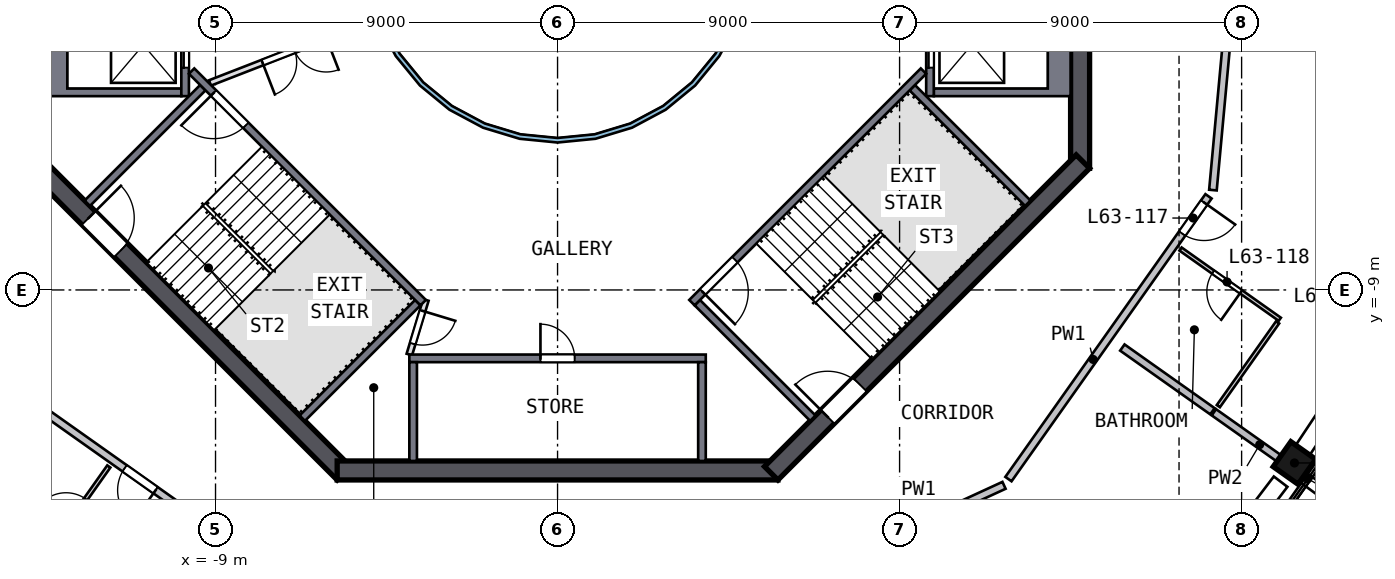
"""IFC4 building model, lengths in metres.
Left out: names, types, materials, properties, quantities, classifications, styles, units other than length and angle.
Written with IfcOpenShell. Run it as: python <this file> out.ifc"""

import sys

from ifc_helpers import new_model, si_unit, direction, frame, frame_2d, origin, origin_2d, place, context, subcontext, project, spatial, polyline, rectangle, outline, extrude, element, fill, save


model = new_model("IFC4")
c1 = context("Model", 3, precision=1e-05, world=origin(), true_north=direction((0.0, 1.0)))
c2 = subcontext(c1, "Body", "Model", "MODEL_VIEW")
j1 = project(units=[si_unit("LENGTHUNIT", "METRE"), si_unit("PLANEANGLEUNIT", "RADIAN")], contexts=[c1])
p1 = place(None, origin())
s1 = spatial("IfcSite", under=j1, at=p1, CompositionType="ELEMENT")
p2 = place(p1, origin())
s2 = spatial("IfcBuilding", under=s1, at=p2, CompositionType="ELEMENT")
p3 = place(p2, frame((0.0, 0.0, 256.0)))
s3 = spatial("IfcBuildingStorey", under=s2, at=p3, CompositionType="ELEMENT", Elevation=256.0)
p4 = place(p3, frame((19.313, -13.664, 0.0), z_axis=(0.06418503, 0.092399066, 0.993651194), x_axis=(0.573792389, 0.811237258, -0.112500692)))
e1 = element("IfcColumn", 1, at=p4, inside=s3, PredefinedType="COLUMN", context=c2, shape_type="SweptSolid", body=[
    extrude(rectangle(XDim=0.8, YDim=0.8, at=origin_2d()), origin(), (0.0, 0.0, 1.0), 3.21),
])
p5 = place(p3, frame((13.75, -5.799, 0.0), z_axis=(0.0, 0.0, 1.0), x_axis=(0.0, 1.0, 0.0)))
e2 = element("IfcWall", 2, at=p5, inside=s3, PredefinedType="SHEAR", context=c2, shape_type="SweptSolid", body=[
    extrude(rectangle(XDim=11.598, YDim=0.5, at=frame_2d((5.799, 0.0))), origin(), (0.0, 0.0, 1.0), 3.5),
])
p6 = place(p5, frame((4.899, 0.0, 0.0)))
e3 = element("IfcOpeningElement", 3, at=p6, cuts=e2, PredefinedType="OPENING", context=c2, shape_type="SweptSolid", body=[
    extrude(rectangle(XDim=1.8, YDim=2.1, at=frame_2d((0.9, 1.05))), frame((0.0, 0.26, 0.0), z_axis=(0.0, -1.0, 0.0), x_axis=(1.0, 0.0, 0.0)), (0.0, 0.0, 1.0), 0.52),
])
p7 = place(p3, frame((-13.823, -5.622, 0.0), z_axis=(0.0, 0.0, 1.0), x_axis=(0.707106781, -0.707106781, 0.0)))
e4 = element("IfcWall", 4, at=p7, inside=s3, PredefinedType="SHEAR", context=c2, shape_type="SweptSolid", body=[
    extrude(rectangle(XDim=11.598, YDim=0.5, at=frame_2d((5.799, 0.0))), origin(), (0.0, 0.0, 1.0), 3.5),
])
p8 = place(p7, frame((2.099, 0.0, 0.0)))
e5 = element("IfcOpeningElement", 5, at=p8, cuts=e4, PredefinedType="OPENING", context=c2, shape_type="SweptSolid", body=[
    extrude(rectangle(XDim=1.2, YDim=2.1, at=frame_2d((0.6, 1.05))), frame((0.0, 0.26, 0.0), z_axis=(0.0, -1.0, 0.0), x_axis=(1.0, 0.0, 0.0)), (0.0, 0.0, 1.0), 0.52),
])
p9 = place(p3, frame((-5.799, -13.75, 0.0), z_axis=(0.0, 0.0, 1.0), x_axis=(1.0, 0.0, 0.0)))
e6 = element("IfcWall", 6, at=p9, inside=s3, PredefinedType="SHEAR", context=c2, shape_type="SweptSolid", body=[
    extrude(rectangle(XDim=11.598, YDim=0.5, at=frame_2d((5.799, 0.0))), origin(), (0.0, 0.0, 1.0), 3.5),
])
p10 = place(p3, frame((5.622, -13.823, 0.0), z_axis=(0.0, 0.0, 1.0), x_axis=(0.707106781, 0.707106781, 0.0)))
e7 = element("IfcWall", 7, at=p10, inside=s3, PredefinedType="SHEAR", context=c2, shape_type="SweptSolid", body=[
    extrude(rectangle(XDim=11.598, YDim=0.5, at=frame_2d((5.799, 0.0))), origin(), (0.0, 0.0, 1.0), 3.5),
])
p11 = place(p10, frame((2.099, 0.0, 0.0)))
e8 = element("IfcOpeningElement", 8, at=p11, cuts=e7, PredefinedType="OPENING", context=c2, shape_type="SweptSolid", body=[
    extrude(rectangle(XDim=1.2, YDim=2.1, at=frame_2d((0.6, 1.05))), frame((0.0, 0.26, 0.0), z_axis=(0.0, -1.0, 0.0), x_axis=(1.0, 0.0, 0.0)), (0.0, 0.0, 1.0), 0.52),
])
p12 = place(p3, frame((18.039, -21.612, 0.0), z_axis=(0.0, 0.0, 1.0), x_axis=(0.577575484, 0.816337283, 0.0)))
e9 = element("IfcWall", 9, at=p12, inside=s3, PredefinedType="SOLIDWALL", context=c2, shape_type="SweptSolid", body=[
    extrude(rectangle(XDim=13.723, YDim=0.5, at=frame_2d((6.862, 0.0))), origin(), (0.0, 0.0, 1.0), 0.7),
])
p13 = place(p3, origin())
e10 = element("IfcWall", 10, at=p13, inside=s3, PredefinedType="SOLIDWALL", context=c2, shape_type="SweptSolid", body=[
    extrude(outline(polyline([(13.5, -3.9), (9.9, -3.9), (9.9, -3.7), (12.9, -3.7), (12.9, -1.4), (9.9, -1.4), (9.9, -1.2), (13.5, -1.2), (13.5, -3.9)])), origin(), (0.0, 0.0, 1.0), 3.19),
])
p14 = place(p3, frame((9.8, -1.2, 0.0), z_axis=(0.0, 0.0, 1.0), x_axis=(0.0, -1.0, 0.0)))
e11 = element("IfcWall", 11, at=p14, inside=s3, PredefinedType="SOLIDWALL", context=c2, shape_type="SweptSolid", body=[
    extrude(rectangle(XDim=2.7, YDim=0.2, at=frame_2d((1.35, 0.0))), origin(), (0.0, 0.0, 1.0), 3.19),
])
p15 = place(p14, frame((0.75, 0.0, 0.0)))
e12 = element("IfcOpeningElement", 12, at=p15, cuts=e11, PredefinedType="OPENING", context=c2, shape_type="SweptSolid", body=[
    extrude(rectangle(XDim=1.2, YDim=2.1, at=frame_2d((0.6, 1.05))), frame((0.0, 0.11, 0.0), z_axis=(0.0, -1.0, 0.0), x_axis=(1.0, 0.0, 0.0)), (0.0, 0.0, 1.0), 0.22),
])
p16 = place(p3, origin())
e13 = element("IfcWall", 13, at=p16, inside=s3, PredefinedType="SOLIDWALL", context=c2, shape_type="SweptSolid", body=[
    extrude(outline(polyline([(-13.5, -3.9), (-13.5, -1.2), (-9.9, -1.2), (-9.9, -1.4), (-12.9, -1.4), (-12.9, -3.7), (-9.9, -3.7), (-9.9, -3.9), (-13.5, -3.9)])), origin(), (0.0, 0.0, 1.0), 3.19),
])
p17 = place(p3, frame((-9.8, -1.2, 0.0), z_axis=(0.0, 0.0, 1.0), x_axis=(0.0, -1.0, 0.0)))
e14 = element("IfcWall", 14, at=p17, inside=s3, PredefinedType="SOLIDWALL", context=c2, shape_type="SweptSolid", body=[
    extrude(rectangle(XDim=2.7, YDim=0.2, at=frame_2d((1.35, 0.0))), origin(), (0.0, 0.0, 1.0), 3.19),
])
p18 = place(p17, frame((0.75, 0.0, 0.0)))
e15 = element("IfcOpeningElement", 15, at=p18, cuts=e14, PredefinedType="OPENING", context=c2, shape_type="SweptSolid", body=[
    extrude(rectangle(XDim=1.2, YDim=2.1, at=frame_2d((0.6, 1.05))), frame((0.0, 0.11, 0.0), z_axis=(0.0, -1.0, 0.0), x_axis=(1.0, 0.0, 0.0)), (0.0, 0.0, 1.0), 0.22),
])
p19 = place(p3, frame((-3.9, -10.8, 0.0), z_axis=(0.0, 0.0, 1.0), x_axis=(1.0, 0.0, 0.0)))
e16 = element("IfcWall", 16, at=p19, inside=s3, PredefinedType="SOLIDWALL", context=c2, shape_type="SweptSolid", body=[
    extrude(rectangle(XDim=7.8, YDim=0.2, at=frame_2d((3.9, 0.0))), origin(), (0.0, 0.0, 1.0), 3.19),
])
p20 = place(p19, frame((3.45, 0.0, 0.0)))
e17 = element("IfcOpeningElement", 17, at=p20, cuts=e16, PredefinedType="OPENING", context=c2, shape_type="SweptSolid", body=[
    extrude(rectangle(XDim=0.9, YDim=2.1, at=frame_2d((0.45, 1.05))), frame((0.0, 0.11, 0.0), z_axis=(0.0, -1.0, 0.0), x_axis=(1.0, 0.0, 0.0)), (0.0, 0.0, 1.0), 0.22),
])
for number, where, z_axis, x_axis in (
    (18, (-3.8, -10.9, 0.0), (0.0, 0.0, 1.0), (0.0, -1.0, 0.0)),
    (19, (3.8, -10.9, 0.0), (0.0, 0.0, 1.0), (0.0, -1.0, 0.0)),
):
    element("IfcWall", number, at=place(p3, frame(where, z_axis=z_axis, x_axis=x_axis)), inside=s3, PredefinedType="SOLIDWALL", context=c2, shape_type="SweptSolid", body=[
        extrude(rectangle(XDim=2.6, YDim=0.2, at=frame_2d((1.3, 0.0))), origin(), (0.0, 0.0, 1.0), 3.19),
    ])
p21 = place(p3, frame((-3.535, -9.334, 0.0), z_axis=(0.0, 0.0, 1.0), x_axis=(-0.707120946, 0.707092617, 0.0)))
e20 = element("IfcWall", 20, at=p21, inside=s3, PredefinedType="SOLIDWALL", context=c2, shape_type="SweptSolid", body=[
    extrude(rectangle(XDim=8.618, YDim=0.2, at=frame_2d((4.309, 0.0))), origin(), (0.0, 0.0, 1.0), 3.19),
])
p22 = place(p21, frame((6.6, 0.0, 0.0)))
e21 = element("IfcOpeningElement", 21, at=p22, cuts=e20, PredefinedType="OPENING", context=c2, shape_type="SweptSolid", body=[
    extrude(rectangle(XDim=1.2, YDim=2.1, at=frame_2d((0.6, 1.05))), frame((0.0, 0.11, 0.0), z_axis=(0.0, -1.0, 0.0), x_axis=(1.0, 0.0, 0.0)), (0.0, 0.0, 1.0), 0.22),
])
for number, where, z_axis, x_axis in (
    (22, (-9.334, -3.677, 0.0), (0.0, 0.0, 1.0), (-0.707, -0.707, 0.0)),
    (23, (-3.677, -9.334, 0.0), (0.0, 0.0, 1.0), (-0.707, -0.707, 0.0)),
):
    element("IfcWall", number, at=place(p3, frame(where, z_axis=z_axis, x_axis=x_axis)), inside=s3, PredefinedType="SOLIDWALL", context=c2, shape_type="SweptSolid", body=[
        extrude(rectangle(XDim=4.3, YDim=0.2, at=frame_2d((2.15, 0.0))), origin(), (0.0, 0.0, 1.0), 3.19),
    ])
p23 = place(p3, frame((9.629, -3.24, 0.0), z_axis=(0.0, 0.0, 1.0), x_axis=(-0.707120946, -0.707092617, 0.0)))
e24 = element("IfcWall", 24, at=p23, inside=s3, PredefinedType="SOLIDWALL", context=c2, shape_type="SweptSolid", body=[
    extrude(rectangle(XDim=8.618, YDim=0.2, at=frame_2d((4.309, 0.0))), origin(), (0.0, 0.0, 1.0), 3.19),
])
p24 = place(p23, frame((7.018, 0.0, 0.0)))
e25 = element("IfcOpeningElement", 25, at=p24, cuts=e24, PredefinedType="OPENING", context=c2, shape_type="SweptSolid", body=[
    extrude(rectangle(XDim=1.2, YDim=2.1, at=frame_2d((0.6, 1.05))), frame((0.0, 0.11, 0.0), z_axis=(0.0, -1.0, 0.0), x_axis=(1.0, 0.0, 0.0)), (0.0, 0.0, 1.0), 0.22),
])
for number, where, z_axis, x_axis in (
    (26, (3.677, -9.334, 0.0), (0.0, 0.0, 1.0), (0.707, -0.707, 0.0)),
    (27, (9.334, -3.677, 0.0), (0.0, 0.0, 1.0), (0.707, -0.707, 0.0)),
):
    element("IfcWall", number, at=place(p3, frame(where, z_axis=z_axis, x_axis=x_axis)), inside=s3, PredefinedType="SOLIDWALL", context=c2, shape_type="SweptSolid", body=[
        extrude(rectangle(XDim=4.3, YDim=0.2, at=frame_2d((2.15, 0.0))), origin(), (0.0, 0.0, 1.0), 3.19),
    ])
p25 = place(p3, frame((-3.465, -9.263, 0.0), z_axis=(0.0, 0.0, 1.0), x_axis=(-0.289808785, -0.957084567, 0.0)))
e28 = element("IfcWall", 28, at=p25, inside=s3, PredefinedType="PARTITIONING", context=c2, shape_type="SweptSolid", body=[
    extrude(rectangle(XDim=1.501, YDim=0.15, at=frame_2d((0.75, 0.0))), origin(), (0.0, 0.0, 1.0), 3.19),
])
p26 = place(p25, frame((0.301, 0.0, 0.0)))
e29 = element("IfcOpeningElement", 29, at=p26, cuts=e28, PredefinedType="OPENING", context=c2, shape_type="SweptSolid", body=[
    extrude(rectangle(XDim=0.9, YDim=2.1, at=frame_2d((0.45, 1.05))), frame((0.0, 0.085, 0.0), z_axis=(0.0, -1.0, 0.0), x_axis=(1.0, 0.0, 0.0)), (0.0, 0.0, 1.0), 0.17),
])
p27 = place(p3, frame((-4.782, -1.857, 0.0), z_axis=(0.0, 0.0, 1.0), x_axis=(-0.932155279, -0.362058746, 0.0)))
e30 = element("IfcWall", 30, at=p27, inside=s3, PredefinedType="PARTITIONING", context=c2, shape_type="SweptSolid", body=[
    extrude(rectangle(XDim=4.682, YDim=0.15, at=frame_2d((2.341, 0.0))), origin(), (0.0, 0.0, 1.0), 3.19),
])
p28 = place(p27, frame((1.4, 0.0, 0.0)))
e31 = element("IfcOpeningElement", 31, at=p28, cuts=e30, PredefinedType="OPENING", context=c2, shape_type="SweptSolid", body=[
    extrude(rectangle(XDim=1.8, YDim=2.1, at=frame_2d((0.9, 1.05))), frame((0.0, 0.085, 0.0), z_axis=(0.0, -1.0, 0.0), x_axis=(1.0, 0.0, 0.0)), (0.0, 0.0, 1.0), 0.17),
])
p29 = place(p3, origin())
e32 = element("IfcWall", 32, at=p29, inside=s3, PredefinedType="SOLIDWALL", context=c2, shape_type="SweptSolid", body=[
    extrude(outline(polyline([(5.021, -0.999), (4.73, -1.959), (4.257, -2.844), (3.62, -3.62), (2.844, -4.257), (1.959, -4.73), (0.999, -5.021), (0.0, -5.12), (-0.999, -5.021), (-1.959, -4.73), (-2.844, -4.257), (-3.62, -3.62), (-4.257, -2.844), (-4.73, -1.959), (-5.021, -0.999), (-5.12, 0.0), (-5.021, 0.999), (-4.73, 1.959), (-4.257, 2.844), (-3.62, 3.62), (-2.844, 4.257), (-1.959, 4.73), (-0.999, 5.021), (0.0, 5.12), (0.999, 5.021), (1.959, 4.73), (2.844, 4.257), (3.62, 3.62), (4.257, 2.844), (4.73, 1.959), (5.021, 0.999), (5.12, 0.0), (5.021, -0.999)]), holes=[polyline([(4.904, 0.976), (4.619, 1.913), (4.157, 2.778), (3.535, 3.535), (2.778, 4.157), (1.913, 4.619), (0.976, 4.904), (0.0, 5.0), (-0.976, 4.904), (-1.913, 4.619), (-2.778, 4.157), (-3.535, 3.535), (-4.157, 2.778), (-4.619, 1.913), (-4.904, 0.976), (-5.0, 0.0), (-4.904, -0.976), (-4.619, -1.913), (-4.157, -2.778), (-3.535, -3.535), (-2.778, -4.157), (-1.913, -4.619), (-0.976, -4.904), (0.0, -5.0), (0.976, -4.904), (1.913, -4.619), (2.778, -4.157), (3.535, -3.535), (4.157, -2.778), (4.619, -1.913), (4.904, -0.976), (5.0, 0.0), (4.904, 0.976)])]), origin(), (0.0, 0.0, 1.0), 3.19),
])
p30 = place(p3, frame((-6.372, -17.245, 0.0), z_axis=(0.0, 0.0, 1.0), x_axis=(-0.81633337, 0.577581016, 0.0)))
e33 = element("IfcWall", 33, at=p30, inside=s3, PredefinedType="SOLIDWALL", context=c2, shape_type="SweptSolid", body=[
    extrude(rectangle(XDim=9.317, YDim=0.2, at=frame_2d((4.658, 0.0))), origin(), (0.0, 0.0, 1.0), 3.19),
])
p31 = place(p30, frame((5.15, 0.0, 0.0)))
e34 = element("IfcOpeningElement", 34, at=p31, cuts=e33, PredefinedType="OPENING", context=c2, shape_type="SweptSolid", body=[
    extrude(rectangle(XDim=1.0, YDim=2.1, at=frame_2d((0.5, 1.05))), frame((0.0, 0.11, 0.0), z_axis=(0.0, -1.0, 0.0), x_axis=(1.0, 0.0, 0.0)), (0.0, 0.0, 1.0), 0.22),
])
p32 = place(p3, frame((11.748, -14.141, 0.0), z_axis=(0.0, 0.0, 1.0), x_axis=(-0.908366241, -0.418175527, 0.0)))
e35 = element("IfcWall", 35, at=p32, inside=s3, PredefinedType="SOLIDWALL", context=c2, shape_type="SweptSolid", body=[
    extrude(rectangle(XDim=9.316, YDim=0.2, at=frame_2d((4.658, 0.0))), origin(), (0.0, 0.0, 1.0), 3.19),
])
p33 = place(p32, frame((5.15, 0.0, 0.0)))
e36 = element("IfcOpeningElement", 36, at=p33, cuts=e35, PredefinedType="OPENING", context=c2, shape_type="SweptSolid", body=[
    extrude(rectangle(XDim=1.0, YDim=2.1, at=frame_2d((0.5, 1.05))), frame((0.0, 0.11, 0.0), z_axis=(0.0, -1.0, 0.0), x_axis=(1.0, 0.0, 0.0)), (0.0, 0.0, 1.0), 0.22),
])
p34 = place(p3, frame((17.129, -6.536, 0.0), z_axis=(0.0, 0.0, 1.0), x_axis=(-0.57757139, -0.81634018, 0.0)))
e37 = element("IfcWall", 37, at=p34, inside=s3, PredefinedType="SOLIDWALL", context=c2, shape_type="SweptSolid", body=[
    extrude(rectangle(XDim=9.115, YDim=0.2, at=frame_2d((4.558, 0.0))), origin(), (0.0, 0.0, 1.0), 3.19),
])
p35 = place(p34, frame((0.2, 0.0, 0.0)))
e38 = element("IfcOpeningElement", 38, at=p35, cuts=e37, PredefinedType="OPENING", context=c2, shape_type="SweptSolid", body=[
    extrude(rectangle(XDim=1.0, YDim=2.1, at=frame_2d((0.5, 1.05))), frame((0.0, 0.11, 0.0), z_axis=(0.0, -1.0, 0.0), x_axis=(1.0, 0.0, 0.0)), (0.0, 0.0, 1.0), 0.22),
])
p36 = place(p3, frame((18.103, 2.905, 0.0), z_axis=(0.0, 0.0, 1.0), x_axis=(-0.092036054, -0.995755675, 0.0)))
e39 = element("IfcWall", 39, at=p36, inside=s3, PredefinedType="SOLIDWALL", context=c2, shape_type="SweptSolid", body=[
    extrude(rectangle(XDim=9.316, YDim=0.2, at=frame_2d((4.658, 0.0))), origin(), (0.0, 0.0, 1.0), 3.19),
])
p37 = place(p36, frame((0.35, 0.0, 0.0)))
e40 = element("IfcOpeningElement", 40, at=p37, cuts=e39, PredefinedType="OPENING", context=c2, shape_type="SweptSolid", body=[
    extrude(rectangle(XDim=1.0, YDim=2.1, at=frame_2d((0.5, 1.05))), frame((0.0, 0.11, 0.0), z_axis=(0.0, -1.0, 0.0), x_axis=(1.0, 0.0, 0.0)), (0.0, 0.0, 1.0), 0.22),
])
p38 = place(p3, frame((14.862, -10.515, 0.0), z_axis=(0.0, 0.0, 1.0), x_axis=(0.816343151, -0.577567191, 0.0)))
e41 = element("IfcWall", 41, at=p38, inside=s3, PredefinedType="SOLIDWALL", context=c2, shape_type="SweptSolid", body=[
    extrude(rectangle(XDim=2.905, YDim=0.2, at=frame_2d((1.452, 0.0))), origin(), (0.0, 0.0, 1.0), 3.19),
])
p39 = place(p3, frame((17.271, -12.219, 0.0), z_axis=(0.0, 0.0, 1.0), x_axis=(0.816307209, -0.577617989, 0.0)))
e42 = element("IfcWall", 42, at=p39, inside=s3, PredefinedType="SOLIDWALL", context=c2, shape_type="SweptSolid", body=[
    extrude(rectangle(XDim=2.952, YDim=0.2, at=frame_2d((1.476, 0.0))), origin(), (0.0, 0.0, 1.0), 3.19),
])
p40 = place(p3, frame((-13.598, -16.175, 0.0), z_axis=(0.0, 0.0, 1.0), x_axis=(0.577567137, 0.816343189, 0.0)))
e43 = element("IfcWall", 43, at=p40, inside=s3, PredefinedType="PARTITIONING", context=c2, shape_type="SweptSolid", body=[
    extrude(rectangle(XDim=3.1, YDim=0.1, at=frame_2d((1.55, 0.0))), origin(), (0.0, 0.0, 1.0), 3.19),
])
p41 = place(p40, frame((1.15, 0.0, 0.0)))
e44 = element("IfcOpeningElement", 44, at=p41, cuts=e43, PredefinedType="OPENING", context=c2, shape_type="SweptSolid", body=[
    extrude(rectangle(XDim=0.9, YDim=2.1, at=frame_2d((0.45, 1.05))), frame((0.0, 0.06, 0.0), z_axis=(0.0, -1.0, 0.0), x_axis=(1.0, 0.0, 0.0)), (0.0, 0.0, 1.0), 0.12),
])
p42 = place(p3, frame((19.005, -9.771, 0.0), z_axis=(0.0, 0.0, 1.0), x_axis=(-0.816318252, 0.577602382, 0.0)))
e45 = element("IfcWall", 45, at=p42, inside=s3, PredefinedType="PARTITIONING", context=c2, shape_type="SweptSolid", body=[
    extrude(rectangle(XDim=3.2, YDim=0.1, at=frame_2d((1.6, 0.0))), origin(), (0.0, 0.0, 1.0), 3.19),
])
p43 = place(p42, frame((1.25, 0.0, 0.0)))
e46 = element("IfcOpeningElement", 46, at=p43, cuts=e45, PredefinedType="OPENING", context=c2, shape_type="SweptSolid", body=[
    extrude(rectangle(XDim=0.9, YDim=2.1, at=frame_2d((0.45, 1.05))), frame((0.0, 0.06, 0.0), z_axis=(0.0, -1.0, 0.0), x_axis=(1.0, 0.0, 0.0)), (0.0, 0.0, 1.0), 0.12),
])
p44 = place(p3, frame((18.947, -9.853, 0.0), z_axis=(0.0, 0.0, 1.0), x_axis=(-0.57754557, -0.816358447, 0.0)))
e47 = element("IfcWall", 47, at=p44, inside=s3, PredefinedType="PARTITIONING", context=c2, shape_type="SweptSolid", body=[
    extrude(rectangle(XDim=2.7, YDim=0.1, at=frame_2d((1.35, 0.0))), origin(), (0.0, 0.0, 1.0), 3.19),
])
p45 = place(p20, origin())
e48 = element("IfcDoor", 48, at=p45, inside=s3, OperationType="SINGLE_SWING_LEFT", PredefinedType="DOOR", context=c2, shape_type="SweptSolid", body=[
    extrude(rectangle(XDim=0.9, YDim=2.1, at=frame_2d((0.45, 1.05))), frame((0.0, 0.025, 0.0), z_axis=(0.0, -1.0, 0.0), x_axis=(1.0, 0.0, 0.0)), (0.0, 0.0, 1.0), 0.05),
])
fill(e17, e48)
p46 = place(p15, origin())
e49 = element("IfcDoor", 49, at=p46, inside=s3, OperationType="DOUBLE_DOOR_SLIDING", PredefinedType="DOOR", context=c2, shape_type="SweptSolid", body=[
    extrude(rectangle(XDim=1.2, YDim=2.1, at=frame_2d((0.6, 1.05))), frame((0.0, 0.025, 0.0), z_axis=(0.0, -1.0, 0.0), x_axis=(1.0, 0.0, 0.0)), (0.0, 0.0, 1.0), 0.05),
])
fill(e12, e49)
p47 = place(p18, origin())
e50 = element("IfcDoor", 50, at=p47, inside=s3, OperationType="DOUBLE_DOOR_SLIDING", PredefinedType="DOOR", context=c2, shape_type="SweptSolid", body=[
    extrude(rectangle(XDim=1.2, YDim=2.1, at=frame_2d((0.6, 1.05))), frame((0.0, 0.025, 0.0), z_axis=(0.0, -1.0, 0.0), x_axis=(1.0, 0.0, 0.0)), (0.0, 0.0, 1.0), 0.05),
])
fill(e15, e50)
p48 = place(p22, origin())
e51 = element("IfcDoor", 51, at=p48, inside=s3, OperationType="SINGLE_SWING_RIGHT", PredefinedType="DOOR", context=c2, shape_type="SweptSolid", body=[
    extrude(rectangle(XDim=1.2, YDim=2.1, at=frame_2d((0.6, 1.05))), frame((0.0, 0.025, 0.0), z_axis=(0.0, -1.0, 0.0), x_axis=(1.0, 0.0, 0.0)), (0.0, 0.0, 1.0), 0.05),
])
fill(e21, e51)
p49 = place(p24, origin())
e52 = element("IfcDoor", 52, at=p49, inside=s3, OperationType="SINGLE_SWING_RIGHT", PredefinedType="DOOR", context=c2, shape_type="SweptSolid", body=[
    extrude(rectangle(XDim=1.2, YDim=2.1, at=frame_2d((0.6, 1.05))), frame((0.0, 0.025, 0.0), z_axis=(0.0, -1.0, 0.0), x_axis=(1.0, 0.0, 0.0)), (0.0, 0.0, 1.0), 0.05),
])
fill(e25, e52)
p50 = place(p8, origin())
e53 = element("IfcDoor", 53, at=p50, inside=s3, OperationType="SINGLE_SWING_LEFT", PredefinedType="DOOR", context=c2, shape_type="SweptSolid", body=[
    extrude(rectangle(XDim=1.2, YDim=2.1, at=frame_2d((0.6, 1.05))), frame((0.0, 0.025, 0.0), z_axis=(0.0, -1.0, 0.0), x_axis=(1.0, 0.0, 0.0)), (0.0, 0.0, 1.0), 0.05),
])
fill(e5, e53)
p51 = place(p11, origin())
e54 = element("IfcDoor", 54, at=p51, inside=s3, OperationType="SINGLE_SWING_LEFT", PredefinedType="DOOR", context=c2, shape_type="SweptSolid", body=[
    extrude(rectangle(XDim=1.2, YDim=2.1, at=frame_2d((0.6, 1.05))), frame((0.0, 0.025, 0.0), z_axis=(0.0, -1.0, 0.0), x_axis=(1.0, 0.0, 0.0)), (0.0, 0.0, 1.0), 0.05),
])
fill(e8, e54)
p52 = place(p26, origin())
e55 = element("IfcDoor", 55, at=p52, inside=s3, OperationType="SINGLE_SWING_LEFT", PredefinedType="DOOR", context=c2, shape_type="SweptSolid", body=[
    extrude(rectangle(XDim=0.9, YDim=2.1, at=frame_2d((0.45, 1.05))), frame((0.0, 0.025, 0.0), z_axis=(0.0, -1.0, 0.0), x_axis=(1.0, 0.0, 0.0)), (0.0, 0.0, 1.0), 0.05),
])
fill(e29, e55)
p53 = place(p28, origin())
e56 = element("IfcDoor", 56, at=p53, inside=s3, OperationType="DOUBLE_DOOR_SINGLE_SWING", PredefinedType="DOOR", context=c2, shape_type="SweptSolid", body=[
    extrude(rectangle(XDim=1.8, YDim=2.1, at=frame_2d((0.9, 1.05))), frame((0.0, 0.025, 0.0), z_axis=(0.0, -1.0, 0.0), x_axis=(1.0, 0.0, 0.0)), (0.0, 0.0, 1.0), 0.05),
])
fill(e31, e56)
p54 = place(p31, origin())
e57 = element("IfcDoor", 57, at=p54, inside=s3, OperationType="SINGLE_SWING_LEFT", PredefinedType="DOOR", context=c2, shape_type="SweptSolid", body=[
    extrude(rectangle(XDim=1.0, YDim=2.1, at=frame_2d((0.5, 1.05))), frame((0.0, 0.025, 0.0), z_axis=(0.0, -1.0, 0.0), x_axis=(1.0, 0.0, 0.0)), (0.0, 0.0, 1.0), 0.05),
])
fill(e34, e57)
p55 = place(p41, origin())
e58 = element("IfcDoor", 58, at=p55, inside=s3, OperationType="SINGLE_SWING_LEFT", PredefinedType="DOOR", context=c2, shape_type="SweptSolid", body=[
    extrude(rectangle(XDim=0.9, YDim=2.1, at=frame_2d((0.45, 1.05))), frame((0.0, 0.025, 0.0), z_axis=(0.0, -1.0, 0.0), x_axis=(1.0, 0.0, 0.0)), (0.0, 0.0, 1.0), 0.05),
])
fill(e44, e58)
p56 = place(p35, origin())
e59 = element("IfcDoor", 59, at=p56, inside=s3, OperationType="SINGLE_SWING_LEFT", PredefinedType="DOOR", context=c2, shape_type="SweptSolid", body=[
    extrude(rectangle(XDim=1.0, YDim=2.1, at=frame_2d((0.5, 1.05))), frame((0.0, 0.025, 0.0), z_axis=(0.0, -1.0, 0.0), x_axis=(1.0, 0.0, 0.0)), (0.0, 0.0, 1.0), 0.05),
])
fill(e38, e59)
p57 = place(p43, origin())
e60 = element("IfcDoor", 60, at=p57, inside=s3, OperationType="SINGLE_SWING_LEFT", PredefinedType="DOOR", context=c2, shape_type="SweptSolid", body=[
    extrude(rectangle(XDim=0.9, YDim=2.1, at=frame_2d((0.45, 1.05))), frame((0.0, 0.025, 0.0), z_axis=(0.0, -1.0, 0.0), x_axis=(1.0, 0.0, 0.0)), (0.0, 0.0, 1.0), 0.05),
])
fill(e46, e60)
save(model, sys.argv[1])
